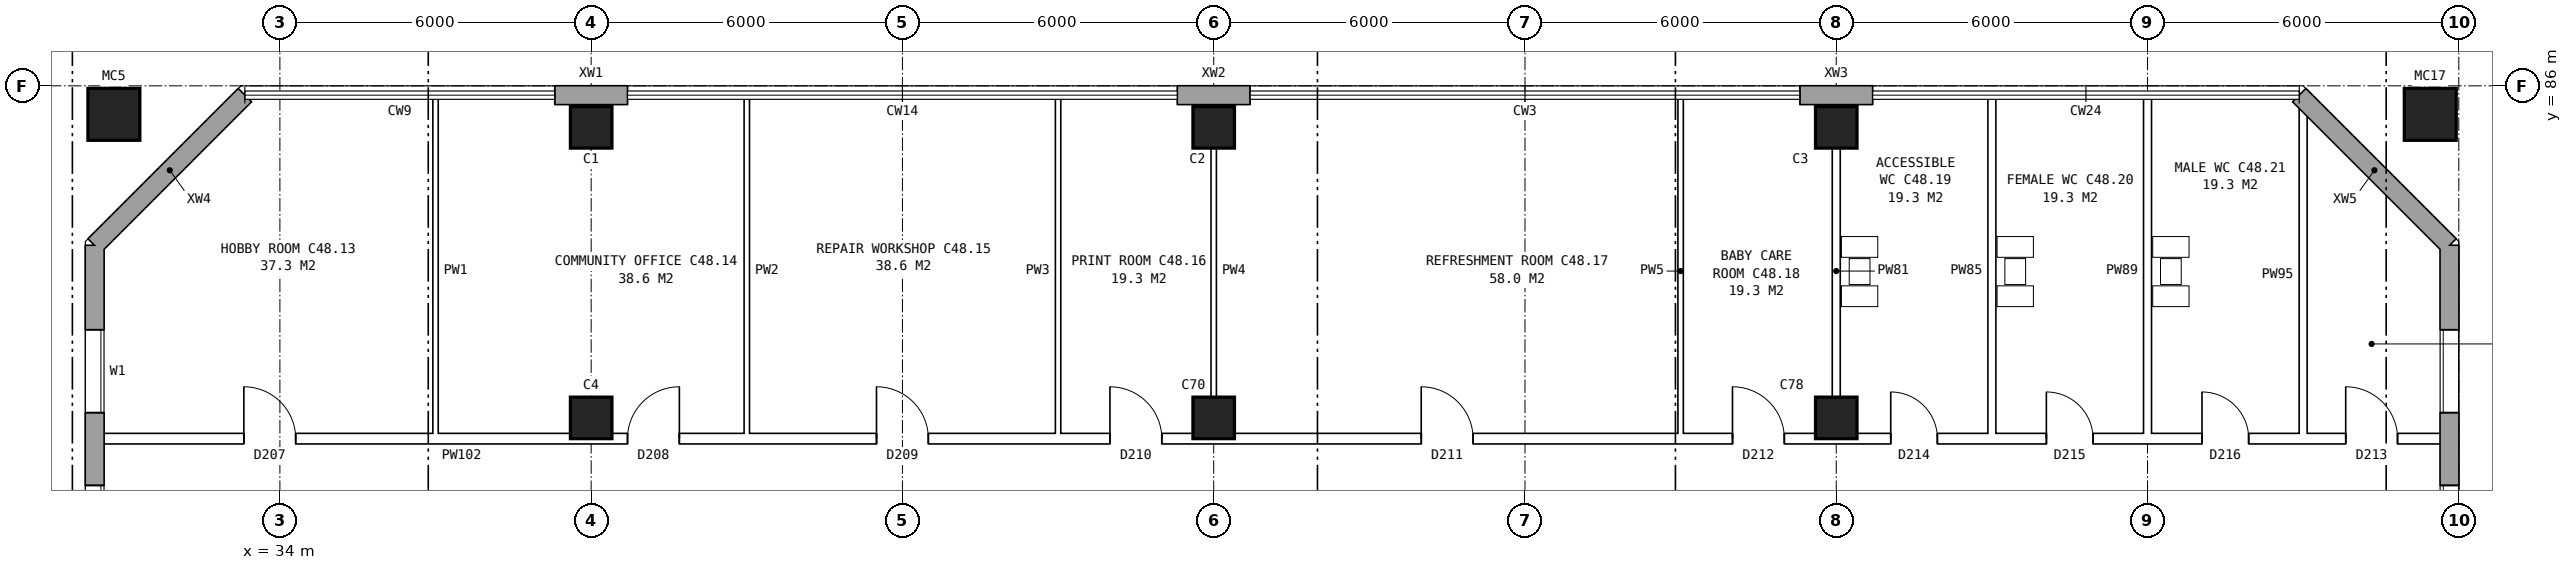
"""IFC4 building model, lengths in metres.
Left out: names, types, materials, properties, quantities, classifications, styles, units other than length and angle.
Written with IfcOpenShell. Run it as: python <this file> out.ifc"""

import sys

from ifc_helpers import new_model, si_unit, direction, frame, frame_2d, origin, origin_2d, place, context, subcontext, project, spatial, rectangle, hollow_rectangle, extrude, element, fill, save


model = new_model("IFC4")
c1 = context("Model", 3, precision=1e-05, world=origin(), true_north=direction((0.0, 1.0)))
c2 = subcontext(c1, "Body", "Model", "MODEL_VIEW")
j1 = project(units=[si_unit("LENGTHUNIT", "METRE"), si_unit("PLANEANGLEUNIT", "RADIAN")], contexts=[c1])
p1 = place(None, origin())
s1 = spatial("IfcSite", under=j1, at=p1, CompositionType="ELEMENT")
p2 = place(p1, origin())
s2 = spatial("IfcBuilding", under=s1, at=p2, CompositionType="ELEMENT")
p3 = place(p2, frame((0.0, 0.0, 171.6)))
s3 = spatial("IfcBuildingStorey", under=s2, at=p3, CompositionType="ELEMENT", Elevation=171.6)
for number, where, z_axis, x_axis in (
    (1, (40.0, 79.6, 0.0), (0.0, 0.0, 1.0), (1.0, 0.0, 0.0)),
    (2, (40.0, 85.2, 0.0), (0.0, 0.0, 1.0), (1.0, 0.0, 0.0)),
    (3, (52.0, 79.6, 0.0), (0.0, 0.0, 1.0), (1.0, 0.0, 0.0)),
    (4, (52.0, 85.2, 0.0), (0.0, 0.0, 1.0), (1.0, 0.0, 0.0)),
    (5, (64.0, 79.6, 0.0), (0.0, 0.0, 1.0), (1.0, 0.0, 0.0)),
    (6, (64.0, 85.2, 0.0), (0.0, 0.0, 1.0), (1.0, 0.0, 0.0)),
):
    element("IfcColumn", number, at=place(p3, frame(where, z_axis=z_axis, x_axis=x_axis)), inside=s3, PredefinedType="COLUMN", context=c2, shape_type="SweptSolid", body=[
        extrude(rectangle(XDim=0.8, YDim=0.8, at=origin_2d()), origin(), (0.0, 0.0, 1.0), 3.6),
    ])
for number, where, z_axis, x_axis in (
    (7, (75.45, 85.45, 0.0), (0.0, 0.0, 1.0), (1.0, 0.0, 0.0)),
    (8, (30.8, 85.45, 0.0), (0.0, 0.0, 1.0), (1.0, 0.0, 0.0)),
):
    element("IfcColumn", number, at=place(p3, frame(where, z_axis=z_axis, x_axis=x_axis)), inside=s3, PredefinedType="COLUMN", context=c2, shape_type="SweptSolid", body=[
        extrude(hollow_rectangle(XDim=1.0, YDim=1.0, WallThickness=0.055, at=origin_2d()), origin(), (0.0, 0.0, 1.0), 4.2),
    ])
p4 = place(p3, frame((75.82, 57.075, 0.0), z_axis=(0.0, 0.0, 1.0), x_axis=(0.0, 1.0, 0.0)))
e9 = element("IfcWall", 9, at=p4, inside=s3, PredefinedType="STANDARD", context=c2, shape_type="SweptSolid", body=[
    extrude(rectangle(XDim=25.851, YDim=0.36, at=frame_2d((12.925, 0.0))), origin(), (0.0, 0.0, 1.0), 3.6),
])
p5 = place(p4, frame((1.625, 0.0, 0.8)))
e10 = element("IfcOpeningElement", 10, at=p5, cuts=e9, PredefinedType="OPENING", context=c2, shape_type="SweptSolid", body=[
    extrude(rectangle(XDim=1.6, YDim=1.8, at=frame_2d((0.8, 0.9))), frame((0.0, 0.19, 0.0), z_axis=(0.0, -1.0, 0.0), x_axis=(1.0, 0.0, 0.0)), (0.0, 0.0, 1.0), 0.38),
])
p6 = place(p4, frame((4.625, 0.0, 0.8)))
e11 = element("IfcOpeningElement", 11, at=p6, cuts=e9, PredefinedType="OPENING", context=c2, shape_type="SweptSolid", body=[
    extrude(rectangle(XDim=1.6, YDim=1.8, at=frame_2d((0.8, 0.9))), frame((0.0, 0.19, 0.0), z_axis=(0.0, -1.0, 0.0), x_axis=(1.0, 0.0, 0.0)), (0.0, 0.0, 1.0), 0.38),
])
p7 = place(p4, frame((19.625, 0.0, 0.8)))
e12 = element("IfcOpeningElement", 12, at=p7, cuts=e9, PredefinedType="OPENING", context=c2, shape_type="SweptSolid", body=[
    extrude(rectangle(XDim=1.6, YDim=1.8, at=frame_2d((0.8, 0.9))), frame((0.0, 0.19, 0.0), z_axis=(0.0, -1.0, 0.0), x_axis=(1.0, 0.0, 0.0)), (0.0, 0.0, 1.0), 0.38),
])
p8 = place(p4, frame((22.625, 0.0, 0.8)))
e13 = element("IfcOpeningElement", 13, at=p8, cuts=e9, PredefinedType="OPENING", context=c2, shape_type="SweptSolid", body=[
    extrude(rectangle(XDim=1.6, YDim=1.8, at=frame_2d((0.8, 0.9))), frame((0.0, 0.19, 0.0), z_axis=(0.0, -1.0, 0.0), x_axis=(1.0, 0.0, 0.0)), (0.0, 0.0, 1.0), 0.38),
])
p9 = place(p3, frame((75.82, 82.925, 0.0), z_axis=(0.0, 0.0, 1.0), x_axis=(-0.707106781187, 0.707106781187, 0.0)))
e14 = element("IfcWall", 14, at=p9, inside=s3, PredefinedType="STANDARD", context=c2, shape_type="SweptSolid", body=[
    extrude(rectangle(XDim=4.094, YDim=0.36, at=frame_2d((2.047, 0.0))), origin(), (0.0, 0.0, 1.0), 3.6),
])
for number, where, z_axis, x_axis in (
    (15, (64.7, 85.82, 0.0), (0.0, 0.0, 1.0), (-1.0, 0.0, 0.0)),
    (16, (52.7, 85.82, 0.0), (0.0, 0.0, 1.0), (-1.0, 0.0, 0.0)),
    (17, (40.7, 85.82, 0.0), (0.0, 0.0, 1.0), (-1.0, 0.0, 0.0)),
):
    element("IfcWall", number, at=place(p3, frame(where, z_axis=z_axis, x_axis=x_axis)), inside=s3, PredefinedType="STANDARD", context=c2, shape_type="SweptSolid", body=[
        extrude(rectangle(XDim=1.4, YDim=0.36, at=frame_2d((0.7, 0.0))), origin(), (0.0, 0.0, 1.0), 3.6),
    ])
p10 = place(p3, frame((33.325, 85.82, 0.0), z_axis=(0.0, 0.0, 1.0), x_axis=(-0.707106781187, -0.707106781187, 0.0)))
e18 = element("IfcWall", 18, at=p10, inside=s3, PredefinedType="STANDARD", context=c2, shape_type="SweptSolid", body=[
    extrude(rectangle(XDim=4.094, YDim=0.36, at=frame_2d((2.047, 0.0))), origin(), (0.0, 0.0, 1.0), 3.6),
])
p11 = place(p3, frame((30.43, 82.925, 0.0), z_axis=(0.0, 0.0, 1.0), x_axis=(0.0, -1.0, 0.0)))
e19 = element("IfcWall", 19, at=p11, inside=s3, PredefinedType="STANDARD", context=c2, shape_type="SweptSolid", body=[
    extrude(rectangle(XDim=25.851, YDim=0.36, at=frame_2d((12.925, 0.0))), origin(), (0.0, 0.0, 1.0), 3.6),
])
p12 = place(p11, frame((1.625, 0.0, 0.8)))
e20 = element("IfcOpeningElement", 20, at=p12, cuts=e19, PredefinedType="OPENING", context=c2, shape_type="SweptSolid", body=[
    extrude(rectangle(XDim=1.6, YDim=1.8, at=frame_2d((0.8, 0.9))), frame((0.0, 0.19, 0.0), z_axis=(0.0, -1.0, 0.0), x_axis=(1.0, 0.0, 0.0)), (0.0, 0.0, 1.0), 0.38),
])
p13 = place(p11, frame((4.625, 0.0, 0.8)))
e21 = element("IfcOpeningElement", 21, at=p13, cuts=e19, PredefinedType="OPENING", context=c2, shape_type="SweptSolid", body=[
    extrude(rectangle(XDim=1.6, YDim=1.8, at=frame_2d((0.8, 0.9))), frame((0.0, 0.19, 0.0), z_axis=(0.0, -1.0, 0.0), x_axis=(1.0, 0.0, 0.0)), (0.0, 0.0, 1.0), 0.38),
])
p14 = place(p11, frame((7.625, 0.0, 0.8)))
e22 = element("IfcOpeningElement", 22, at=p14, cuts=e19, PredefinedType="OPENING", context=c2, shape_type="SweptSolid", body=[
    extrude(rectangle(XDim=1.6, YDim=1.8, at=frame_2d((0.8, 0.9))), frame((0.0, 0.19, 0.0), z_axis=(0.0, -1.0, 0.0), x_axis=(1.0, 0.0, 0.0)), (0.0, 0.0, 1.0), 0.38),
])
p15 = place(p11, frame((10.625, 0.0, 0.8)))
e23 = element("IfcOpeningElement", 23, at=p15, cuts=e19, PredefinedType="OPENING", context=c2, shape_type="SweptSolid", body=[
    extrude(rectangle(XDim=1.6, YDim=1.8, at=frame_2d((0.8, 0.9))), frame((0.0, 0.19, 0.0), z_axis=(0.0, -1.0, 0.0), x_axis=(1.0, 0.0, 0.0)), (0.0, 0.0, 1.0), 0.38),
])
p16 = place(p11, frame((13.625, 0.0, 0.8)))
e24 = element("IfcOpeningElement", 24, at=p16, cuts=e19, PredefinedType="OPENING", context=c2, shape_type="SweptSolid", body=[
    extrude(rectangle(XDim=1.6, YDim=1.8, at=frame_2d((0.8, 0.9))), frame((0.0, 0.19, 0.0), z_axis=(0.0, -1.0, 0.0), x_axis=(1.0, 0.0, 0.0)), (0.0, 0.0, 1.0), 0.38),
])
p17 = place(p11, frame((16.625, 0.0, 0.8)))
e25 = element("IfcOpeningElement", 25, at=p17, cuts=e19, PredefinedType="OPENING", context=c2, shape_type="SweptSolid", body=[
    extrude(rectangle(XDim=1.6, YDim=1.8, at=frame_2d((0.8, 0.9))), frame((0.0, 0.19, 0.0), z_axis=(0.0, -1.0, 0.0), x_axis=(1.0, 0.0, 0.0)), (0.0, 0.0, 1.0), 0.38),
])
p18 = place(p11, frame((19.625, 0.0, 0.8)))
e26 = element("IfcOpeningElement", 26, at=p18, cuts=e19, PredefinedType="OPENING", context=c2, shape_type="SweptSolid", body=[
    extrude(rectangle(XDim=1.6, YDim=1.8, at=frame_2d((0.8, 0.9))), frame((0.0, 0.19, 0.0), z_axis=(0.0, -1.0, 0.0), x_axis=(1.0, 0.0, 0.0)), (0.0, 0.0, 1.0), 0.38),
])
p19 = place(p11, frame((22.625, 0.0, 0.8)))
e27 = element("IfcOpeningElement", 27, at=p19, cuts=e19, PredefinedType="OPENING", context=c2, shape_type="SweptSolid", body=[
    extrude(rectangle(XDim=1.6, YDim=1.8, at=frame_2d((0.8, 0.9))), frame((0.0, 0.19, 0.0), z_axis=(0.0, -1.0, 0.0), x_axis=(1.0, 0.0, 0.0)), (0.0, 0.0, 1.0), 0.38),
])
p20 = place(p3, frame((30.49, 79.2, 0.0), z_axis=(0.0, 0.0, 1.0), x_axis=(1.0, 0.0, 0.0)))
e28 = element("IfcWall", 28, at=p20, inside=s3, PredefinedType="PARTITIONING", context=c2, shape_type="SweptSolid", body=[
    extrude(rectangle(XDim=45.27, YDim=0.2, at=frame_2d((22.635, 0.0))), origin(), (0.0, 0.0, 1.0), 3.6),
])
p21 = place(p20, frame((2.815, 0.0, 0.0)))
e29 = element("IfcOpeningElement", 29, at=p21, cuts=e28, PredefinedType="OPENING", context=c2, shape_type="SweptSolid", body=[
    extrude(rectangle(XDim=1.0, YDim=2.1, at=frame_2d((0.5, 1.05))), frame((0.0, 0.11, 0.0), z_axis=(0.0, -1.0, 0.0), x_axis=(1.0, 0.0, 0.0)), (0.0, 0.0, 1.0), 0.22),
])
p22 = place(p20, frame((10.21, 0.0, 0.0)))
e30 = element("IfcOpeningElement", 30, at=p22, cuts=e28, PredefinedType="OPENING", context=c2, shape_type="SweptSolid", body=[
    extrude(rectangle(XDim=1.0, YDim=2.1, at=frame_2d((0.5, 1.05))), frame((0.0, 0.11, 0.0), z_axis=(0.0, -1.0, 0.0), x_axis=(1.0, 0.0, 0.0)), (0.0, 0.0, 1.0), 0.22),
])
p23 = place(p20, frame((15.01, 0.0, 0.0)))
e31 = element("IfcOpeningElement", 31, at=p23, cuts=e28, PredefinedType="OPENING", context=c2, shape_type="SweptSolid", body=[
    extrude(rectangle(XDim=1.0, YDim=2.1, at=frame_2d((0.5, 1.05))), frame((0.0, 0.11, 0.0), z_axis=(0.0, -1.0, 0.0), x_axis=(1.0, 0.0, 0.0)), (0.0, 0.0, 1.0), 0.22),
])
p24 = place(p20, frame((19.51, 0.0, 0.0)))
e32 = element("IfcOpeningElement", 32, at=p24, cuts=e28, PredefinedType="OPENING", context=c2, shape_type="SweptSolid", body=[
    extrude(rectangle(XDim=1.0, YDim=2.1, at=frame_2d((0.5, 1.05))), frame((0.0, 0.11, 0.0), z_axis=(0.0, -1.0, 0.0), x_axis=(1.0, 0.0, 0.0)), (0.0, 0.0, 1.0), 0.22),
])
p25 = place(p20, frame((25.51, 0.0, 0.0)))
e33 = element("IfcOpeningElement", 33, at=p25, cuts=e28, PredefinedType="OPENING", context=c2, shape_type="SweptSolid", body=[
    extrude(rectangle(XDim=1.0, YDim=2.1, at=frame_2d((0.5, 1.05))), frame((0.0, 0.11, 0.0), z_axis=(0.0, -1.0, 0.0), x_axis=(1.0, 0.0, 0.0)), (0.0, 0.0, 1.0), 0.22),
])
p26 = place(p20, frame((31.51, 0.0, 0.0)))
e34 = element("IfcOpeningElement", 34, at=p26, cuts=e28, PredefinedType="OPENING", context=c2, shape_type="SweptSolid", body=[
    extrude(rectangle(XDim=1.0, YDim=2.1, at=frame_2d((0.5, 1.05))), frame((0.0, 0.11, 0.0), z_axis=(0.0, -1.0, 0.0), x_axis=(1.0, 0.0, 0.0)), (0.0, 0.0, 1.0), 0.22),
])
p27 = place(p20, frame((34.56, 0.0, 0.0)))
e35 = element("IfcOpeningElement", 35, at=p27, cuts=e28, PredefinedType="OPENING", context=c2, shape_type="SweptSolid", body=[
    extrude(rectangle(XDim=0.9, YDim=2.1, at=frame_2d((0.45, 1.05))), frame((0.0, 0.11, 0.0), z_axis=(0.0, -1.0, 0.0), x_axis=(1.0, 0.0, 0.0)), (0.0, 0.0, 1.0), 0.22),
])
p28 = place(p20, frame((37.56, 0.0, 0.0)))
e36 = element("IfcOpeningElement", 36, at=p28, cuts=e28, PredefinedType="OPENING", context=c2, shape_type="SweptSolid", body=[
    extrude(rectangle(XDim=0.9, YDim=2.1, at=frame_2d((0.45, 1.05))), frame((0.0, 0.11, 0.0), z_axis=(0.0, -1.0, 0.0), x_axis=(1.0, 0.0, 0.0)), (0.0, 0.0, 1.0), 0.22),
])
p29 = place(p20, frame((40.56, 0.0, 0.0)))
e37 = element("IfcOpeningElement", 37, at=p29, cuts=e28, PredefinedType="OPENING", context=c2, shape_type="SweptSolid", body=[
    extrude(rectangle(XDim=0.9, YDim=2.1, at=frame_2d((0.45, 1.05))), frame((0.0, 0.11, 0.0), z_axis=(0.0, -1.0, 0.0), x_axis=(1.0, 0.0, 0.0)), (0.0, 0.0, 1.0), 0.22),
])
p30 = place(p20, frame((43.33, 0.0, 0.0)))
e38 = element("IfcOpeningElement", 38, at=p30, cuts=e28, PredefinedType="OPENING", context=c2, shape_type="SweptSolid", body=[
    extrude(rectangle(XDim=1.0, YDim=2.1, at=frame_2d((0.5, 1.05))), frame((0.0, 0.11, 0.0), z_axis=(0.0, -1.0, 0.0), x_axis=(1.0, 0.0, 0.0)), (0.0, 0.0, 1.0), 0.22),
])
for number, where, z_axis, x_axis in (
    (39, (37.0, 79.1, 0.0), (0.0, 0.0, 1.0), (0.0, 1.0, 0.0)),
    (40, (43.0, 79.1, 0.0), (0.0, 0.0, 1.0), (0.0, 1.0, 0.0)),
    (41, (49.0, 79.1, 0.0), (0.0, 0.0, 1.0), (0.0, 1.0, 0.0)),
    (42, (52.0, 79.1, 0.0), (0.0, 0.0, 1.0), (0.0, 1.0, 0.0)),
    (43, (61.0, 79.1, 0.0), (0.0, 0.0, 1.0), (0.0, 1.0, 0.0)),
):
    element("IfcWall", number, at=place(p3, frame(where, z_axis=z_axis, x_axis=x_axis)), inside=s3, PredefinedType="PARTITIONING", context=c2, shape_type="SweptSolid", body=[
        extrude(rectangle(XDim=6.66, YDim=0.1, at=frame_2d((3.33, 0.0))), origin(), (0.0, 0.0, 1.0), 3.6),
    ])
for number, where, z_axis, x_axis in (
    (44, (64.0, 79.1, 0.0), (0.0, 0.0, 1.0), (0.0, 1.0, 0.0)),
    (45, (67.0, 79.1, 0.0), (0.0, 0.0, 1.0), (0.0, 1.0, 0.0)),
    (46, (70.0, 79.1, 0.0), (0.0, 0.0, 1.0), (0.0, 1.0, 0.0)),
):
    element("IfcWall", number, at=place(p3, frame(where, z_axis=z_axis, x_axis=x_axis)), inside=s3, PredefinedType="PLUMBINGWALL", context=c2, shape_type="SweptSolid", body=[
        extrude(rectangle(XDim=6.66, YDim=0.15, at=frame_2d((3.33, 0.0))), origin(), (0.0, 0.0, 1.0), 3.6),
    ])
p31 = place(p3, frame((73.0, 79.1, 0.0), z_axis=(0.0, 0.0, 1.0), x_axis=(0.0, 1.0, 0.0)))
e47 = element("IfcWall", 47, at=p31, inside=s3, PredefinedType="PLUMBINGWALL", context=c2, shape_type="SweptSolid", body=[
    extrude(rectangle(XDim=6.511, YDim=0.15, at=frame_2d((3.255, 0.0))), origin(), (0.0, 0.0, 1.0), 3.6),
])
p32 = place(p7, origin())
e48 = element("IfcWindow", 48, at=p32, inside=s3, PartitioningType="SINGLE_PANEL", PredefinedType="WINDOW", context=c2, shape_type="SweptSolid", body=[
    extrude(rectangle(XDim=1.6, YDim=1.8, at=frame_2d((0.8, 0.9))), frame((0.0, 0.15, 0.0), z_axis=(0.0, -1.0, 0.0), x_axis=(1.0, 0.0, 0.0)), (0.0, 0.0, 1.0), 0.06),
])
fill(e12, e48)
p33 = place(p8, origin())
e49 = element("IfcWindow", 49, at=p33, inside=s3, PartitioningType="SINGLE_PANEL", PredefinedType="WINDOW", context=c2, shape_type="SweptSolid", body=[
    extrude(rectangle(XDim=1.6, YDim=1.8, at=frame_2d((0.8, 0.9))), frame((0.0, 0.15, 0.0), z_axis=(0.0, -1.0, 0.0), x_axis=(1.0, 0.0, 0.0)), (0.0, 0.0, 1.0), 0.06),
])
fill(e13, e49)
p34 = place(p12, origin())
e50 = element("IfcWindow", 50, at=p34, inside=s3, PartitioningType="SINGLE_PANEL", PredefinedType="WINDOW", context=c2, shape_type="SweptSolid", body=[
    extrude(rectangle(XDim=1.6, YDim=1.8, at=frame_2d((0.8, 0.9))), frame((0.0, 0.15, 0.0), z_axis=(0.0, -1.0, 0.0), x_axis=(1.0, 0.0, 0.0)), (0.0, 0.0, 1.0), 0.06),
])
fill(e20, e50)
p35 = place(p13, origin())
e51 = element("IfcWindow", 51, at=p35, inside=s3, PartitioningType="SINGLE_PANEL", PredefinedType="WINDOW", context=c2, shape_type="SweptSolid", body=[
    extrude(rectangle(XDim=1.6, YDim=1.8, at=frame_2d((0.8, 0.9))), frame((0.0, 0.15, 0.0), z_axis=(0.0, -1.0, 0.0), x_axis=(1.0, 0.0, 0.0)), (0.0, 0.0, 1.0), 0.06),
])
fill(e21, e51)
p36 = place(p21, origin())
e52 = element("IfcDoor", 52, at=p36, inside=s3, OperationType="SINGLE_SWING_LEFT", PredefinedType="DOOR", context=c2, shape_type="SweptSolid", body=[
    extrude(rectangle(XDim=1.0, YDim=2.1, at=frame_2d((0.5, 1.05))), frame((0.0, 0.025, 0.0), z_axis=(0.0, -1.0, 0.0), x_axis=(1.0, 0.0, 0.0)), (0.0, 0.0, 1.0), 0.05),
])
fill(e29, e52)
p37 = place(p22, origin())
e53 = element("IfcDoor", 53, at=p37, inside=s3, OperationType="SINGLE_SWING_RIGHT", PredefinedType="DOOR", context=c2, shape_type="SweptSolid", body=[
    extrude(rectangle(XDim=1.0, YDim=2.1, at=frame_2d((0.5, 1.05))), frame((0.0, 0.025, 0.0), z_axis=(0.0, -1.0, 0.0), x_axis=(1.0, 0.0, 0.0)), (0.0, 0.0, 1.0), 0.05),
])
fill(e30, e53)
p38 = place(p23, origin())
e54 = element("IfcDoor", 54, at=p38, inside=s3, OperationType="SINGLE_SWING_LEFT", PredefinedType="DOOR", context=c2, shape_type="SweptSolid", body=[
    extrude(rectangle(XDim=1.0, YDim=2.1, at=frame_2d((0.5, 1.05))), frame((0.0, 0.025, 0.0), z_axis=(0.0, -1.0, 0.0), x_axis=(1.0, 0.0, 0.0)), (0.0, 0.0, 1.0), 0.05),
])
fill(e31, e54)
p39 = place(p24, origin())
e55 = element("IfcDoor", 55, at=p39, inside=s3, OperationType="SINGLE_SWING_LEFT", PredefinedType="DOOR", context=c2, shape_type="SweptSolid", body=[
    extrude(rectangle(XDim=1.0, YDim=2.1, at=frame_2d((0.5, 1.05))), frame((0.0, 0.025, 0.0), z_axis=(0.0, -1.0, 0.0), x_axis=(1.0, 0.0, 0.0)), (0.0, 0.0, 1.0), 0.05),
])
fill(e32, e55)
p40 = place(p25, origin())
e56 = element("IfcDoor", 56, at=p40, inside=s3, OperationType="SINGLE_SWING_LEFT", PredefinedType="DOOR", context=c2, shape_type="SweptSolid", body=[
    extrude(rectangle(XDim=1.0, YDim=2.1, at=frame_2d((0.5, 1.05))), frame((0.0, 0.025, 0.0), z_axis=(0.0, -1.0, 0.0), x_axis=(1.0, 0.0, 0.0)), (0.0, 0.0, 1.0), 0.05),
])
fill(e33, e56)
p41 = place(p26, origin())
e57 = element("IfcDoor", 57, at=p41, inside=s3, OperationType="SINGLE_SWING_LEFT", PredefinedType="DOOR", context=c2, shape_type="SweptSolid", body=[
    extrude(rectangle(XDim=1.0, YDim=2.1, at=frame_2d((0.5, 1.05))), frame((0.0, 0.025, 0.0), z_axis=(0.0, -1.0, 0.0), x_axis=(1.0, 0.0, 0.0)), (0.0, 0.0, 1.0), 0.05),
])
fill(e34, e57)
p42 = place(p27, origin())
e58 = element("IfcDoor", 58, at=p42, inside=s3, OperationType="SINGLE_SWING_LEFT", PredefinedType="DOOR", context=c2, shape_type="SweptSolid", body=[
    extrude(rectangle(XDim=0.9, YDim=2.1, at=frame_2d((0.45, 1.05))), frame((0.0, 0.025, 0.0), z_axis=(0.0, -1.0, 0.0), x_axis=(1.0, 0.0, 0.0)), (0.0, 0.0, 1.0), 0.05),
])
fill(e35, e58)
p43 = place(p28, origin())
e59 = element("IfcDoor", 59, at=p43, inside=s3, OperationType="SINGLE_SWING_LEFT", PredefinedType="DOOR", context=c2, shape_type="SweptSolid", body=[
    extrude(rectangle(XDim=0.9, YDim=2.1, at=frame_2d((0.45, 1.05))), frame((0.0, 0.025, 0.0), z_axis=(0.0, -1.0, 0.0), x_axis=(1.0, 0.0, 0.0)), (0.0, 0.0, 1.0), 0.05),
])
fill(e36, e59)
p44 = place(p29, origin())
e60 = element("IfcDoor", 60, at=p44, inside=s3, OperationType="SINGLE_SWING_LEFT", PredefinedType="DOOR", context=c2, shape_type="SweptSolid", body=[
    extrude(rectangle(XDim=0.9, YDim=2.1, at=frame_2d((0.45, 1.05))), frame((0.0, 0.025, 0.0), z_axis=(0.0, -1.0, 0.0), x_axis=(1.0, 0.0, 0.0)), (0.0, 0.0, 1.0), 0.05),
])
fill(e37, e60)
p45 = place(p30, origin())
e61 = element("IfcDoor", 61, at=p45, inside=s3, OperationType="SINGLE_SWING_LEFT", PredefinedType="DOOR", context=c2, shape_type="SweptSolid", body=[
    extrude(rectangle(XDim=1.0, YDim=2.1, at=frame_2d((0.5, 1.05))), frame((0.0, 0.025, 0.0), z_axis=(0.0, -1.0, 0.0), x_axis=(1.0, 0.0, 0.0)), (0.0, 0.0, 1.0), 0.05),
])
fill(e38, e61)
save(model, sys.argv[1])
